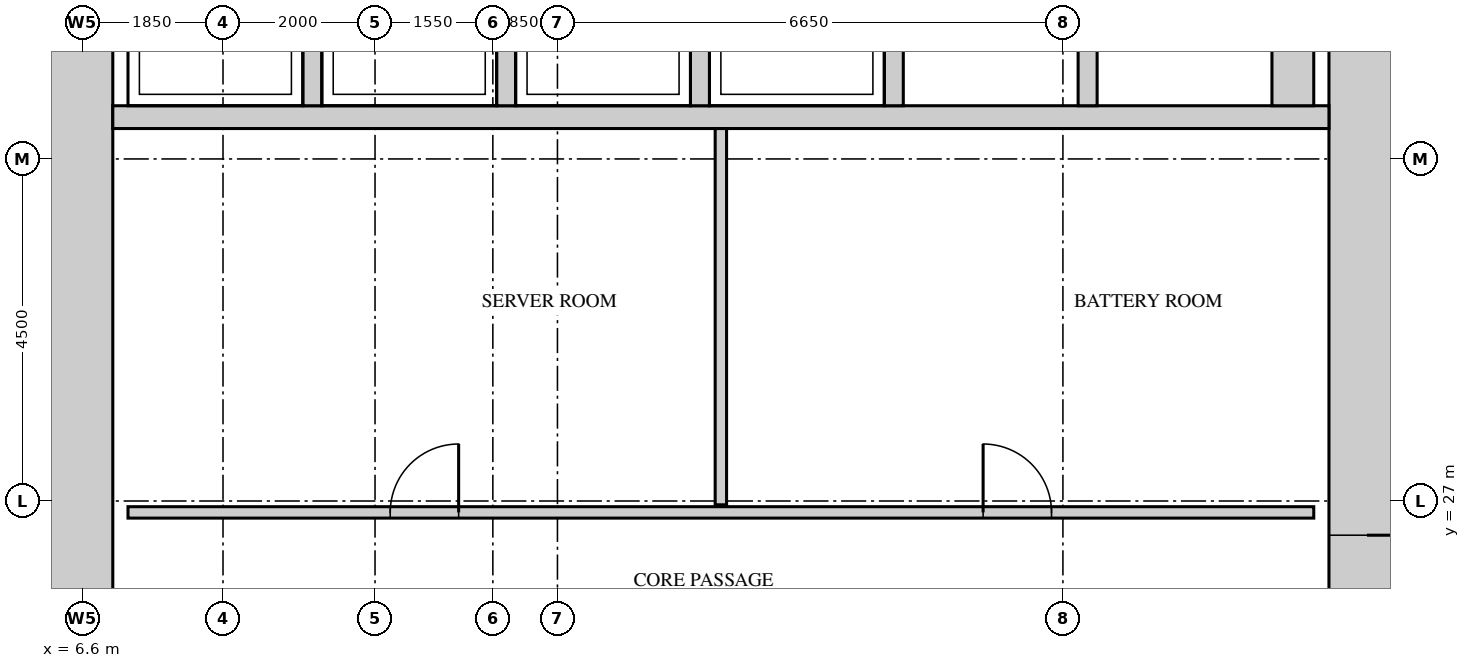
"""IFC4 building model, lengths in metres.
Left out: names, types, materials, properties, quantities, classifications, styles, units other than length and angle.
Written with IfcOpenShell. Run it as: python <this file> out.ifc"""

import sys

from ifc_helpers import new_model, si_unit, direction, frame, frame_2d, origin, place, context, subcontext, project, spatial, rectangle, extrude, source, transform, mapped, element, fill, save


model = new_model("IFC4")
c1 = context("Model", 3, precision=1e-05, world=origin(), true_north=direction((0.0, 1.0)))
c2 = subcontext(c1, "Body", "Model", "MODEL_VIEW")
j1 = project(units=[si_unit("LENGTHUNIT", "METRE"), si_unit("PLANEANGLEUNIT", "RADIAN")], contexts=[c1])
p1 = place(None, origin())
s1 = spatial("IfcSite", under=j1, at=p1, CompositionType="ELEMENT")
p2 = place(p1, origin())
s2 = spatial("IfcBuilding", under=s1, at=p2, CompositionType="ELEMENT")
p3 = place(p2, frame((0.0, 0.0, 145.5)))
s3 = spatial("IfcBuildingStorey", under=s2, at=p3, CompositionType="ELEMENT", Elevation=145.5)
m1 = source(origin(), c2, "Body", "SweptSolid", [
    extrude(rectangle(XDim=28.0, YDim=1.0, at=frame_2d((14.0, 0.0))), origin(), (0.0, 0.0, 1.0), 4.1),
])
p4 = place(p3, frame((23.5, 13.0, 0.0), z_axis=(0.0, 0.0, 1.0), x_axis=(0.0, 1.0, 0.0)))
e1 = element("IfcWall", 1, at=p4, inside=s3, PredefinedType="SHEAR", context=c2, shape_type="MappedRepresentation", body=[
    mapped(m1, transform((0.0, 0.0, 0.0))),
])
m2 = source(origin(), c2, "Body", "SweptSolid", [
    extrude(rectangle(XDim=1.8, YDim=2.1, at=frame_2d((0.9, 1.05))), frame((0.0, 0.51, 0.0), z_axis=(0.0, -1.0, 0.0), x_axis=(1.0, 0.0, 0.0)), (0.0, 0.0, 1.0), 1.02),
])
p5 = place(p4, frame((22.6, 0.0, 0.0)))
e2 = element("IfcOpeningElement", 2, at=p5, cuts=e1, PredefinedType="OPENING", context=c2, shape_type="MappedRepresentation", body=[
    mapped(m2, transform((0.0, 0.0, 0.0))),
])
m3 = source(origin(), c2, "Body", "SweptSolid", [
    extrude(rectangle(XDim=1.2, YDim=2.1, at=frame_2d((0.6, 1.05))), frame((0.0, 0.51, 0.0), z_axis=(0.0, -1.0, 0.0), x_axis=(1.0, 0.0, 0.0)), (0.0, 0.0, 1.0), 1.02),
])
p6 = place(p4, frame((12.35, 0.0, 0.0)))
e3 = element("IfcOpeningElement", 3, at=p6, cuts=e1, PredefinedType="OPENING", context=c2, shape_type="MappedRepresentation", body=[
    mapped(m3, transform((0.0, 0.0, 0.0))),
])
m4 = source(origin(), c2, "Body", "SweptSolid", [
    extrude(rectangle(XDim=0.9, YDim=2.1, at=frame_2d((0.45, 1.05))), frame((0.0, 0.51, 0.0), z_axis=(0.0, -1.0, 0.0), x_axis=(1.0, 0.0, 0.0)), (0.0, 0.0, 1.0), 1.02),
])
p7 = place(p4, frame((4.6, 0.0, 0.0)))
e4 = element("IfcOpeningElement", 4, at=p7, cuts=e1, PredefinedType="OPENING", context=c2, shape_type="MappedRepresentation", body=[
    mapped(m4, transform((0.0, 0.0, 0.0))),
])
p8 = place(p3, frame((6.5, 13.0, 0.0), z_axis=(0.0, 0.0, 1.0), x_axis=(0.0, 1.0, 0.0)))
e5 = element("IfcWall", 5, at=p8, inside=s3, PredefinedType="SHEAR", context=c2, shape_type="MappedRepresentation", body=[
    mapped(m1, transform((0.0, 0.0, 0.0))),
])
m5 = source(origin(), c2, "Body", "SweptSolid", [
    extrude(rectangle(XDim=16.0, YDim=0.3, at=frame_2d((8.0, 0.0))), origin(), (0.0, 0.0, 1.0), 4.1),
])
p9 = place(p3, frame((7.0, 32.05, 0.0), z_axis=(0.0, 0.0, 1.0), x_axis=(1.0, 0.0, 0.0)))
e6 = element("IfcWall", 6, at=p9, inside=s3, PredefinedType="STANDARD", context=c2, shape_type="MappedRepresentation", body=[
    mapped(m5, transform((0.0, 0.0, 0.0))),
])
m6 = source(origin(), c2, "Body", "SweptSolid", [
    extrude(rectangle(XDim=2.4, YDim=0.25, at=frame_2d((1.2, 0.0))), origin(), (0.0, 0.0, 1.0), 4.1),
])
for number, where, z_axis, x_axis in (
    (7, (9.625, 32.2, 0.0), (0.0, 0.0, 1.0), (0.0, 1.0, 0.0)),
    (8, (12.175, 32.2, 0.0), (0.0, 0.0, 1.0), (0.0, 1.0, 0.0)),
    (9, (14.725, 32.2, 0.0), (0.0, 0.0, 1.0), (0.0, 1.0, 0.0)),
    (10, (17.275, 32.2, 0.0), (0.0, 0.0, 1.0), (0.0, 1.0, 0.0)),
    (11, (19.825, 32.2, 0.0), (0.0, 0.0, 1.0), (0.0, 1.0, 0.0)),
):
    element("IfcWall", number, at=place(p3, frame(where, z_axis=z_axis, x_axis=x_axis)), inside=s3, PredefinedType="STANDARD", context=c2, shape_type="MappedRepresentation", body=[
        mapped(m6, transform((0.0, 0.0, 0.0))),
    ])
m7 = source(origin(), c2, "Body", "SweptSolid", [
    extrude(rectangle(XDim=2.4, YDim=0.55, at=frame_2d((1.2, 0.0))), origin(), (0.0, 0.0, 1.0), 4.1),
])
p10 = place(p3, frame((22.525, 32.2, 0.0), z_axis=(0.0, 0.0, 1.0), x_axis=(0.0, 1.0, 0.0)))
e12 = element("IfcWall", 12, at=p10, inside=s3, PredefinedType="STANDARD", context=c2, shape_type="MappedRepresentation", body=[
    mapped(m7, transform((0.0, 0.0, 0.0))),
])
m8 = source(origin(), c2, "Body", "SweptSolid", [
    extrude(rectangle(XDim=15.6, YDim=0.15, at=frame_2d((7.8, 0.0))), origin(), (0.0, 0.0, 1.0), 4.2),
])
p11 = place(p3, frame((7.2, 26.85, 0.0), z_axis=(0.0, 0.0, 1.0), x_axis=(1.0, 0.0, 0.0)))
e13 = element("IfcWall", 13, at=p11, inside=s3, PredefinedType="PARTITIONING", context=c2, shape_type="MappedRepresentation", body=[
    mapped(m8, transform((0.0, 0.0, 0.0))),
])
m9 = source(origin(), c2, "Body", "SweptSolid", [
    extrude(rectangle(XDim=0.9, YDim=2.1, at=frame_2d((0.45, 1.05))), frame((0.0, 0.085, 0.0), z_axis=(0.0, -1.0, 0.0), x_axis=(1.0, 0.0, 0.0)), (0.0, 0.0, 1.0), 0.17),
])
p12 = place(p11, frame((3.45, 0.0, 0.0)))
e14 = element("IfcOpeningElement", 14, at=p12, cuts=e13, PredefinedType="OPENING", context=c2, shape_type="MappedRepresentation", body=[
    mapped(m9, transform((0.0, 0.0, 0.0))),
])
p13 = place(p11, frame((11.25, 0.0, 0.0)))
e15 = element("IfcOpeningElement", 15, at=p13, cuts=e13, PredefinedType="OPENING", context=c2, shape_type="MappedRepresentation", body=[
    mapped(m9, transform((0.0, 0.0, 0.0))),
])
m10 = source(origin(), c2, "Body", "SweptSolid", [
    extrude(rectangle(XDim=4.95, YDim=0.15, at=frame_2d((2.475, 0.0))), origin(), (0.0, 0.0, 1.0), 4.2),
])
p14 = place(p3, frame((15.0, 26.95, 0.0), z_axis=(0.0, 0.0, 1.0), x_axis=(0.0, 1.0, 0.0)))
e16 = element("IfcWall", 16, at=p14, inside=s3, PredefinedType="PARTITIONING", context=c2, shape_type="MappedRepresentation", body=[
    mapped(m10, transform((0.0, 0.0, 0.0))),
])
m11 = source(origin(), c2, "Body", "SweptSolid", [
    extrude(rectangle(XDim=1.2, YDim=2.1, at=frame_2d((0.6, 1.05))), frame((0.0, 0.45, 0.0), z_axis=(0.0, -1.0, 0.0), x_axis=(1.0, 0.0, 0.0)), (0.0, 0.0, 1.0), 0.9),
])
p15 = place(p6, origin())
e17 = element("IfcDoor", 17, at=p15, inside=s3, OperationType="SINGLE_SWING_RIGHT", PredefinedType="DOOR", context=c2, shape_type="MappedRepresentation", body=[
    mapped(m11, transform((0.0, 0.0, 0.0))),
])
fill(e3, e17)
m12 = source(origin(), c2, "Body", "SweptSolid", [
    extrude(rectangle(XDim=0.9, YDim=2.1, at=frame_2d((0.45, 1.05))), frame((0.0, 0.025, 0.0), z_axis=(0.0, -1.0, 0.0), x_axis=(1.0, 0.0, 0.0)), (0.0, 0.0, 1.0), 0.05),
])
p16 = place(p12, origin())
e18 = element("IfcDoor", 18, at=p16, inside=s3, OperationType="SINGLE_SWING_LEFT", PredefinedType="DOOR", context=c2, shape_type="MappedRepresentation", body=[
    mapped(m12, transform((0.0, 0.0, 0.0))),
])
fill(e14, e18)
p17 = place(p13, origin())
e19 = element("IfcDoor", 19, at=p17, inside=s3, OperationType="SINGLE_SWING_RIGHT", PredefinedType="DOOR", context=c2, shape_type="MappedRepresentation", body=[
    mapped(m12, transform((0.0, 0.0, 0.0))),
])
fill(e15, e19)
save(model, sys.argv[1])
